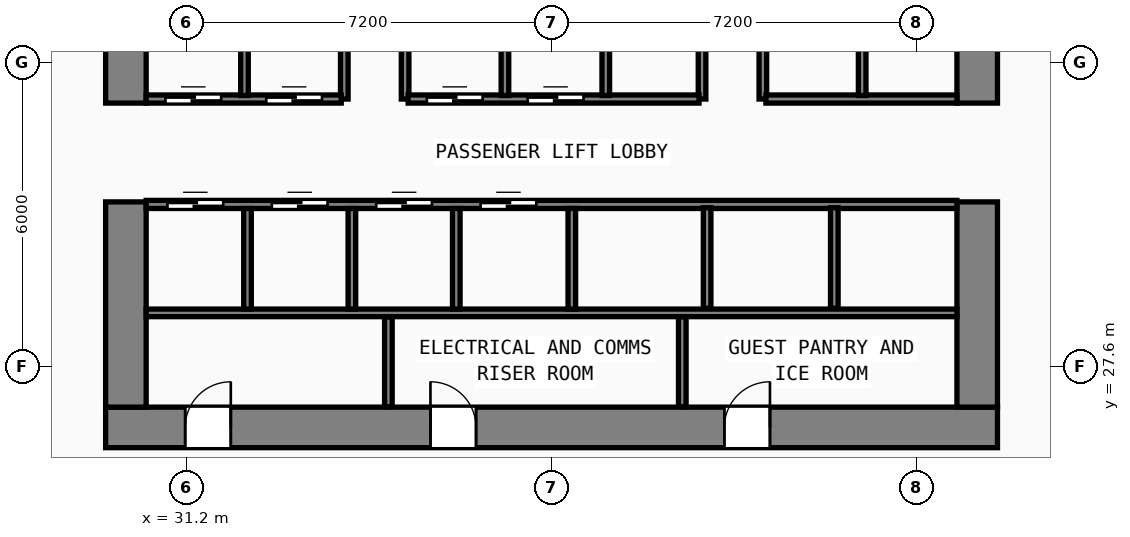
"""IFC4 building model, lengths in metres.
Left out: names, types, materials, properties, quantities, classifications, styles, units other than length and angle.
Written with IfcOpenShell. Run it as: python <this file> out.ifc"""

import sys

from ifc_helpers import new_model, si_unit, direction, frame, frame_2d, origin, place, context, subcontext, project, spatial, rectangle, extrude, element, fill, save


model = new_model("IFC4")
c1 = context("Model", 3, precision=1e-05, world=origin(), true_north=direction((0.0, 1.0)))
c2 = subcontext(c1, "Body", "Model", "MODEL_VIEW")
j1 = project(units=[si_unit("LENGTHUNIT", "METRE"), si_unit("PLANEANGLEUNIT", "RADIAN")], contexts=[c1])
p1 = place(None, origin())
s1 = spatial("IfcSite", under=j1, at=p1, CompositionType="ELEMENT")
p2 = place(p1, origin())
s2 = spatial("IfcBuilding", under=s1, at=p2, CompositionType="ELEMENT")
p3 = place(p2, frame((0.0, 0.0, 10.2)))
s3 = spatial("IfcBuildingStorey", under=s2, at=p3, CompositionType="ELEMENT", Elevation=10.2)
p4 = place(p3, frame((29.6, 26.4, 0.0), z_axis=(0.0, 0.0, 1.0), x_axis=(1.0, 0.0, 0.0)))
e1 = element("IfcWall", 1, at=p4, inside=s3, PredefinedType="SHEAR", context=c2, shape_type="SweptSolid", body=[
    extrude(rectangle(XDim=17.6, YDim=0.8, at=frame_2d((8.8, 0.0))), origin(), (0.0, 0.0, 1.0), 5.16),
])
p5 = place(p4, frame((2.47, 0.0, 0.0), z_axis=(0.0, 0.0, 1.0), x_axis=(-1.0, 0.0, 0.0)))
e2 = element("IfcOpeningElement", 2, at=p5, cuts=e1, PredefinedType="OPENING", context=c2, shape_type="SweptSolid", body=[
    extrude(rectangle(XDim=0.9, YDim=2.1, at=frame_2d((0.45, 1.05))), frame((0.0, 0.41, 0.0), z_axis=(0.0, -1.0, 0.0), x_axis=(1.0, 0.0, 0.0)), (0.0, 0.0, 1.0), 0.82),
])
p6 = place(p4, frame((7.31, 0.0, 0.0), z_axis=(0.0, 0.0, 1.0), x_axis=(-1.0, 0.0, 0.0)))
e3 = element("IfcOpeningElement", 3, at=p6, cuts=e1, PredefinedType="OPENING", context=c2, shape_type="SweptSolid", body=[
    extrude(rectangle(XDim=0.9, YDim=2.1, at=frame_2d((0.45, 1.05))), frame((0.0, 0.41, 0.0), z_axis=(0.0, -1.0, 0.0), x_axis=(1.0, 0.0, 0.0)), (0.0, 0.0, 1.0), 0.82),
])
p7 = place(p4, frame((13.11, 0.0, 0.0), z_axis=(0.0, 0.0, 1.0), x_axis=(-1.0, 0.0, 0.0)))
e4 = element("IfcOpeningElement", 4, at=p7, cuts=e1, PredefinedType="OPENING", context=c2, shape_type="SweptSolid", body=[
    extrude(rectangle(XDim=0.9, YDim=2.1, at=frame_2d((0.45, 1.05))), frame((0.0, 0.41, 0.0), z_axis=(0.0, -1.0, 0.0), x_axis=(1.0, 0.0, 0.0)), (0.0, 0.0, 1.0), 0.82),
])
p8 = place(p3, frame((30.0, 26.8, 0.0), z_axis=(0.0, 0.0, 1.0), x_axis=(0.0, 1.0, 0.0)))
e5 = element("IfcWall", 5, at=p8, inside=s3, PredefinedType="SHEAR", context=c2, shape_type="SweptSolid", body=[
    extrude(rectangle(XDim=4.05, YDim=0.8, at=frame_2d((2.025, 0.0))), origin(), (0.0, 0.0, 1.0), 5.16),
])
p9 = place(p3, frame((30.0, 32.8, 0.0), z_axis=(0.0, 0.0, 1.0), x_axis=(0.0, 1.0, 0.0)))
e6 = element("IfcWall", 6, at=p9, inside=s3, PredefinedType="SHEAR", context=c2, shape_type="SweptSolid", body=[
    extrude(rectangle(XDim=10.0, YDim=0.8, at=frame_2d((5.0, 0.0))), origin(), (0.0, 0.0, 1.0), 5.16),
])
p10 = place(p3, frame((46.8, 26.8, 0.0), z_axis=(0.0, 0.0, 1.0), x_axis=(0.0, 1.0, 0.0)))
e7 = element("IfcWall", 7, at=p10, inside=s3, PredefinedType="SHEAR", context=c2, shape_type="SweptSolid", body=[
    extrude(rectangle(XDim=4.05, YDim=0.8, at=frame_2d((2.025, 0.0))), origin(), (0.0, 0.0, 1.0), 5.16),
])
p11 = place(p3, frame((46.8, 32.8, 0.0), z_axis=(0.0, 0.0, 1.0), x_axis=(0.0, 1.0, 0.0)))
e8 = element("IfcWall", 8, at=p11, inside=s3, PredefinedType="SHEAR", context=c2, shape_type="SweptSolid", body=[
    extrude(rectangle(XDim=10.0, YDim=0.8, at=frame_2d((5.0, 0.0))), origin(), (0.0, 0.0, 1.0), 5.16),
])
for number, where, z_axis, x_axis in (
    (9, (34.31, 32.88, 0.0), (0.0, 0.0, 1.0), (0.0, 1.0, 0.0)),
    (10, (35.51, 32.88, 0.0), (0.0, 0.0, 1.0), (0.0, 1.0, 0.0)),
    (11, (41.37, 32.88, 0.0), (0.0, 0.0, 1.0), (0.0, 1.0, 0.0)),
    (12, (42.57, 32.88, 0.0), (0.0, 0.0, 1.0), (0.0, 1.0, 0.0)),
):
    element("IfcWall", number, at=place(p3, frame(where, z_axis=z_axis, x_axis=x_axis)), inside=s3, PredefinedType="SOLIDWALL", context=c2, shape_type="SweptSolid", body=[
        extrude(rectangle(XDim=2.17, YDim=0.15, at=frame_2d((1.085, 0.0))), origin(), (0.0, 0.0, 1.0), 5.16),
    ])
p12 = place(p3, frame((30.4, 32.88, 0.0), z_axis=(0.0, 0.0, 1.0), x_axis=(1.0, 0.0, 0.0)))
e13 = element("IfcWall", 13, at=p12, inside=s3, PredefinedType="SOLIDWALL", context=c2, shape_type="SweptSolid", body=[
    extrude(rectangle(XDim=3.85, YDim=0.16, at=frame_2d((1.925, 0.0))), origin(), (0.0, 0.0, 1.0), 5.16),
])
p13 = place(p12, frame((1.48, 0.0, 0.0), z_axis=(0.0, 0.0, 1.0), x_axis=(-1.0, 0.0, 0.0)))
e14 = element("IfcOpeningElement", 14, at=p13, cuts=e13, PredefinedType="OPENING", context=c2, shape_type="SweptSolid", body=[
    extrude(rectangle(XDim=1.1, YDim=2.2, at=frame_2d((0.55, 1.1))), frame((0.0, 0.09, 0.0), z_axis=(0.0, -1.0, 0.0), x_axis=(1.0, 0.0, 0.0)), (0.0, 0.0, 1.0), 0.18),
])
p14 = place(p12, frame((3.47, 0.0, 0.0), z_axis=(0.0, 0.0, 1.0), x_axis=(-1.0, 0.0, 0.0)))
e15 = element("IfcOpeningElement", 15, at=p14, cuts=e13, PredefinedType="OPENING", context=c2, shape_type="SweptSolid", body=[
    extrude(rectangle(XDim=1.1, YDim=2.2, at=frame_2d((0.55, 1.1))), frame((0.0, 0.09, 0.0), z_axis=(0.0, -1.0, 0.0), x_axis=(1.0, 0.0, 0.0)), (0.0, 0.0, 1.0), 0.18),
])
p15 = place(p3, frame((35.57, 32.88, 0.0), z_axis=(0.0, 0.0, 1.0), x_axis=(1.0, 0.0, 0.0)))
e16 = element("IfcWall", 16, at=p15, inside=s3, PredefinedType="SOLIDWALL", context=c2, shape_type="SweptSolid", body=[
    extrude(rectangle(XDim=5.74, YDim=0.16, at=frame_2d((2.87, 0.0))), origin(), (0.0, 0.0, 1.0), 5.16),
])
p16 = place(p15, frame((1.47, 0.0, 0.0), z_axis=(0.0, 0.0, 1.0), x_axis=(-1.0, 0.0, 0.0)))
e17 = element("IfcOpeningElement", 17, at=p16, cuts=e16, PredefinedType="OPENING", context=c2, shape_type="SweptSolid", body=[
    extrude(rectangle(XDim=1.1, YDim=2.2, at=frame_2d((0.55, 1.1))), frame((0.0, 0.09, 0.0), z_axis=(0.0, -1.0, 0.0), x_axis=(1.0, 0.0, 0.0)), (0.0, 0.0, 1.0), 0.18),
])
p17 = place(p15, frame((3.46, 0.0, 0.0), z_axis=(0.0, 0.0, 1.0), x_axis=(-1.0, 0.0, 0.0)))
e18 = element("IfcOpeningElement", 18, at=p17, cuts=e16, PredefinedType="OPENING", context=c2, shape_type="SweptSolid", body=[
    extrude(rectangle(XDim=1.1, YDim=2.2, at=frame_2d((0.55, 1.1))), frame((0.0, 0.09, 0.0), z_axis=(0.0, -1.0, 0.0), x_axis=(1.0, 0.0, 0.0)), (0.0, 0.0, 1.0), 0.18),
])
p18 = place(p3, frame((42.63, 32.88, 0.0), z_axis=(0.0, 0.0, 1.0), x_axis=(1.0, 0.0, 0.0)))
e19 = element("IfcWall", 19, at=p18, inside=s3, PredefinedType="SOLIDWALL", context=c2, shape_type="SweptSolid", body=[
    extrude(rectangle(XDim=3.77, YDim=0.16, at=frame_2d((1.885, 0.0))), origin(), (0.0, 0.0, 1.0), 5.16),
])
for number, where, z_axis, x_axis in (
    (20, (32.34, 32.95, 0.0), (0.0, 0.0, 1.0), (0.0, 1.0, 0.0)),
    (21, (37.48, 32.95, 0.0), (0.0, 0.0, 1.0), (0.0, 1.0, 0.0)),
    (22, (39.47, 32.95, 0.0), (0.0, 0.0, 1.0), (0.0, 1.0, 0.0)),
    (23, (44.53, 32.95, 0.0), (0.0, 0.0, 1.0), (0.0, 1.0, 0.0)),
):
    element("IfcWall", number, at=place(p3, frame(where, z_axis=z_axis, x_axis=x_axis)), inside=s3, PredefinedType="SOLIDWALL", context=c2, shape_type="SweptSolid", body=[
        extrude(rectangle(XDim=2.05, YDim=0.15, at=frame_2d((1.025, 0.0))), origin(), (0.0, 0.0, 1.0), 5.16),
    ])
p19 = place(p3, frame((30.4, 30.8, 0.0), z_axis=(0.0, 0.0, 1.0), x_axis=(1.0, 0.0, 0.0)))
e24 = element("IfcWall", 24, at=p19, inside=s3, PredefinedType="SOLIDWALL", context=c2, shape_type="SweptSolid", body=[
    extrude(rectangle(XDim=16.0, YDim=0.16, at=frame_2d((8.0, 0.0))), origin(), (0.0, 0.0, 1.0), 5.16),
])
p20 = place(p19, frame((0.42, 0.0, 0.0)))
e25 = element("IfcOpeningElement", 25, at=p20, cuts=e24, PredefinedType="OPENING", context=c2, shape_type="SweptSolid", body=[
    extrude(rectangle(XDim=1.1, YDim=2.2, at=frame_2d((0.55, 1.1))), frame((0.0, 0.09, 0.0), z_axis=(0.0, -1.0, 0.0), x_axis=(1.0, 0.0, 0.0)), (0.0, 0.0, 1.0), 0.18),
])
p21 = place(p19, frame((2.48, 0.0, 0.0)))
e26 = element("IfcOpeningElement", 26, at=p21, cuts=e24, PredefinedType="OPENING", context=c2, shape_type="SweptSolid", body=[
    extrude(rectangle(XDim=1.1, YDim=2.2, at=frame_2d((0.55, 1.1))), frame((0.0, 0.09, 0.0), z_axis=(0.0, -1.0, 0.0), x_axis=(1.0, 0.0, 0.0)), (0.0, 0.0, 1.0), 0.18),
])
p22 = place(p19, frame((4.54, 0.0, 0.0)))
e27 = element("IfcOpeningElement", 27, at=p22, cuts=e24, PredefinedType="OPENING", context=c2, shape_type="SweptSolid", body=[
    extrude(rectangle(XDim=1.1, YDim=2.2, at=frame_2d((0.55, 1.1))), frame((0.0, 0.09, 0.0), z_axis=(0.0, -1.0, 0.0), x_axis=(1.0, 0.0, 0.0)), (0.0, 0.0, 1.0), 0.18),
])
p23 = place(p19, frame((6.6, 0.0, 0.0)))
e28 = element("IfcOpeningElement", 28, at=p23, cuts=e24, PredefinedType="OPENING", context=c2, shape_type="SweptSolid", body=[
    extrude(rectangle(XDim=1.1, YDim=2.2, at=frame_2d((0.55, 1.1))), frame((0.0, 0.09, 0.0), z_axis=(0.0, -1.0, 0.0), x_axis=(1.0, 0.0, 0.0)), (0.0, 0.0, 1.0), 0.18),
])
p24 = place(p3, frame((30.4, 28.66, 0.0), z_axis=(0.0, 0.0, 1.0), x_axis=(1.0, 0.0, 0.0)))
e29 = element("IfcWall", 29, at=p24, inside=s3, PredefinedType="PARTITIONING", context=c2, shape_type="SweptSolid", body=[
    extrude(rectangle(XDim=16.0, YDim=0.15, at=frame_2d((8.0, 0.0))), origin(), (0.0, 0.0, 1.0), 5.16),
])
for number, where, z_axis, x_axis in (
    (30, (32.4, 28.735, 0.0), (0.0, 0.0, 1.0), (0.0, 1.0, 0.0)),
    (31, (34.46, 28.735, 0.0), (0.0, 0.0, 1.0), (0.0, 1.0, 0.0)),
    (32, (36.52, 28.735, 0.0), (0.0, 0.0, 1.0), (0.0, 1.0, 0.0)),
    (33, (38.8, 28.735, 0.0), (0.0, 0.0, 1.0), (0.0, 1.0, 0.0)),
):
    element("IfcWall", number, at=place(p3, frame(where, z_axis=z_axis, x_axis=x_axis)), inside=s3, PredefinedType="SOLIDWALL", context=c2, shape_type="SweptSolid", body=[
        extrude(rectangle(XDim=1.985, YDim=0.15, at=frame_2d((0.992, 0.0))), origin(), (0.0, 0.0, 1.0), 5.16),
    ])
for number, where, z_axis, x_axis in (
    (34, (35.18, 26.81, 0.0), (0.0, 0.0, 1.0), (0.0, 1.0, 0.0)),
    (35, (40.98, 26.81, 0.0), (0.0, 0.0, 1.0), (0.0, 1.0, 0.0)),
):
    element("IfcWall", number, at=place(p3, frame(where, z_axis=z_axis, x_axis=x_axis)), inside=s3, PredefinedType="PARTITIONING", context=c2, shape_type="SweptSolid", body=[
        extrude(rectangle(XDim=1.77, YDim=0.15, at=frame_2d((0.885, 0.0))), origin(), (0.0, 0.0, 1.0), 5.16),
    ])
for number, where, z_axis, x_axis in (
    (36, (41.47, 28.75, 0.0), (0.0, 0.0, 1.0), (0.0, 1.0, 0.0)),
    (37, (43.98, 28.75, 0.0), (0.0, 0.0, 1.0), (0.0, 1.0, 0.0)),
):
    element("IfcWall", number, at=place(p3, frame(where, z_axis=z_axis, x_axis=x_axis)), inside=s3, PredefinedType="SOLIDWALL", context=c2, shape_type="SweptSolid", body=[
        extrude(rectangle(XDim=1.985, YDim=0.15, at=frame_2d((0.993, 0.0))), origin(), (0.0, 0.0, 1.0), 5.16),
    ])
p25 = place(p13, origin())
e38 = element("IfcDoor", 38, at=p25, inside=s3, OperationType="SLIDING_TO_LEFT", PredefinedType="DOOR", context=c2, shape_type="SweptSolid", body=[
    extrude(rectangle(XDim=1.1, YDim=2.2, at=frame_2d((0.55, 1.1))), frame((0.0, 0.025, 0.0), z_axis=(0.0, -1.0, 0.0), x_axis=(1.0, 0.0, 0.0)), (0.0, 0.0, 1.0), 0.05),
])
fill(e14, e38)
p26 = place(p14, origin())
e39 = element("IfcDoor", 39, at=p26, inside=s3, OperationType="SLIDING_TO_LEFT", PredefinedType="DOOR", context=c2, shape_type="SweptSolid", body=[
    extrude(rectangle(XDim=1.1, YDim=2.2, at=frame_2d((0.55, 1.1))), frame((0.0, 0.025, 0.0), z_axis=(0.0, -1.0, 0.0), x_axis=(1.0, 0.0, 0.0)), (0.0, 0.0, 1.0), 0.05),
])
fill(e15, e39)
p27 = place(p16, origin())
e40 = element("IfcDoor", 40, at=p27, inside=s3, OperationType="SLIDING_TO_LEFT", PredefinedType="DOOR", context=c2, shape_type="SweptSolid", body=[
    extrude(rectangle(XDim=1.1, YDim=2.2, at=frame_2d((0.55, 1.1))), frame((0.0, 0.025, 0.0), z_axis=(0.0, -1.0, 0.0), x_axis=(1.0, 0.0, 0.0)), (0.0, 0.0, 1.0), 0.05),
])
fill(e17, e40)
p28 = place(p17, origin())
e41 = element("IfcDoor", 41, at=p28, inside=s3, OperationType="SLIDING_TO_LEFT", PredefinedType="DOOR", context=c2, shape_type="SweptSolid", body=[
    extrude(rectangle(XDim=1.1, YDim=2.2, at=frame_2d((0.55, 1.1))), frame((0.0, 0.025, 0.0), z_axis=(0.0, -1.0, 0.0), x_axis=(1.0, 0.0, 0.0)), (0.0, 0.0, 1.0), 0.05),
])
fill(e18, e41)
p29 = place(p20, origin())
e42 = element("IfcDoor", 42, at=p29, inside=s3, OperationType="SLIDING_TO_LEFT", PredefinedType="DOOR", context=c2, shape_type="SweptSolid", body=[
    extrude(rectangle(XDim=1.1, YDim=2.2, at=frame_2d((0.55, 1.1))), frame((0.0, 0.025, 0.0), z_axis=(0.0, -1.0, 0.0), x_axis=(1.0, 0.0, 0.0)), (0.0, 0.0, 1.0), 0.05),
])
fill(e25, e42)
p30 = place(p21, origin())
e43 = element("IfcDoor", 43, at=p30, inside=s3, OperationType="SLIDING_TO_LEFT", PredefinedType="DOOR", context=c2, shape_type="SweptSolid", body=[
    extrude(rectangle(XDim=1.1, YDim=2.2, at=frame_2d((0.55, 1.1))), frame((0.0, 0.025, 0.0), z_axis=(0.0, -1.0, 0.0), x_axis=(1.0, 0.0, 0.0)), (0.0, 0.0, 1.0), 0.05),
])
fill(e26, e43)
p31 = place(p22, origin())
e44 = element("IfcDoor", 44, at=p31, inside=s3, OperationType="SLIDING_TO_LEFT", PredefinedType="DOOR", context=c2, shape_type="SweptSolid", body=[
    extrude(rectangle(XDim=1.1, YDim=2.2, at=frame_2d((0.55, 1.1))), frame((0.0, 0.025, 0.0), z_axis=(0.0, -1.0, 0.0), x_axis=(1.0, 0.0, 0.0)), (0.0, 0.0, 1.0), 0.05),
])
fill(e27, e44)
p32 = place(p23, origin())
e45 = element("IfcDoor", 45, at=p32, inside=s3, OperationType="SLIDING_TO_LEFT", PredefinedType="DOOR", context=c2, shape_type="SweptSolid", body=[
    extrude(rectangle(XDim=1.1, YDim=2.2, at=frame_2d((0.55, 1.1))), frame((0.0, 0.025, 0.0), z_axis=(0.0, -1.0, 0.0), x_axis=(1.0, 0.0, 0.0)), (0.0, 0.0, 1.0), 0.05),
])
fill(e28, e45)
p33 = place(p5, origin())
e46 = element("IfcDoor", 46, at=p33, inside=s3, OperationType="SINGLE_SWING_LEFT", PredefinedType="DOOR", context=c2, shape_type="SweptSolid", body=[
    extrude(rectangle(XDim=0.9, YDim=2.1, at=frame_2d((0.45, 1.05))), frame((0.0, -0.195, 0.0), z_axis=(0.0, -1.0, 0.0), x_axis=(1.0, 0.0, 0.0)), (0.0, 0.0, 1.0), 0.05),
])
fill(e2, e46)
p34 = place(p6, origin())
e47 = element("IfcDoor", 47, at=p34, inside=s3, OperationType="SINGLE_SWING_RIGHT", PredefinedType="DOOR", context=c2, shape_type="SweptSolid", body=[
    extrude(rectangle(XDim=0.9, YDim=2.1, at=frame_2d((0.45, 1.05))), frame((0.0, -0.195, 0.0), z_axis=(0.0, -1.0, 0.0), x_axis=(1.0, 0.0, 0.0)), (0.0, 0.0, 1.0), 0.05),
])
fill(e3, e47)
p35 = place(p7, origin())
e48 = element("IfcDoor", 48, at=p35, inside=s3, OperationType="SINGLE_SWING_LEFT", PredefinedType="DOOR", context=c2, shape_type="SweptSolid", body=[
    extrude(rectangle(XDim=0.9, YDim=2.1, at=frame_2d((0.45, 1.05))), frame((0.0, -0.195, 0.0), z_axis=(0.0, -1.0, 0.0), x_axis=(1.0, 0.0, 0.0)), (0.0, 0.0, 1.0), 0.05),
])
fill(e4, e48)
save(model, sys.argv[1])
